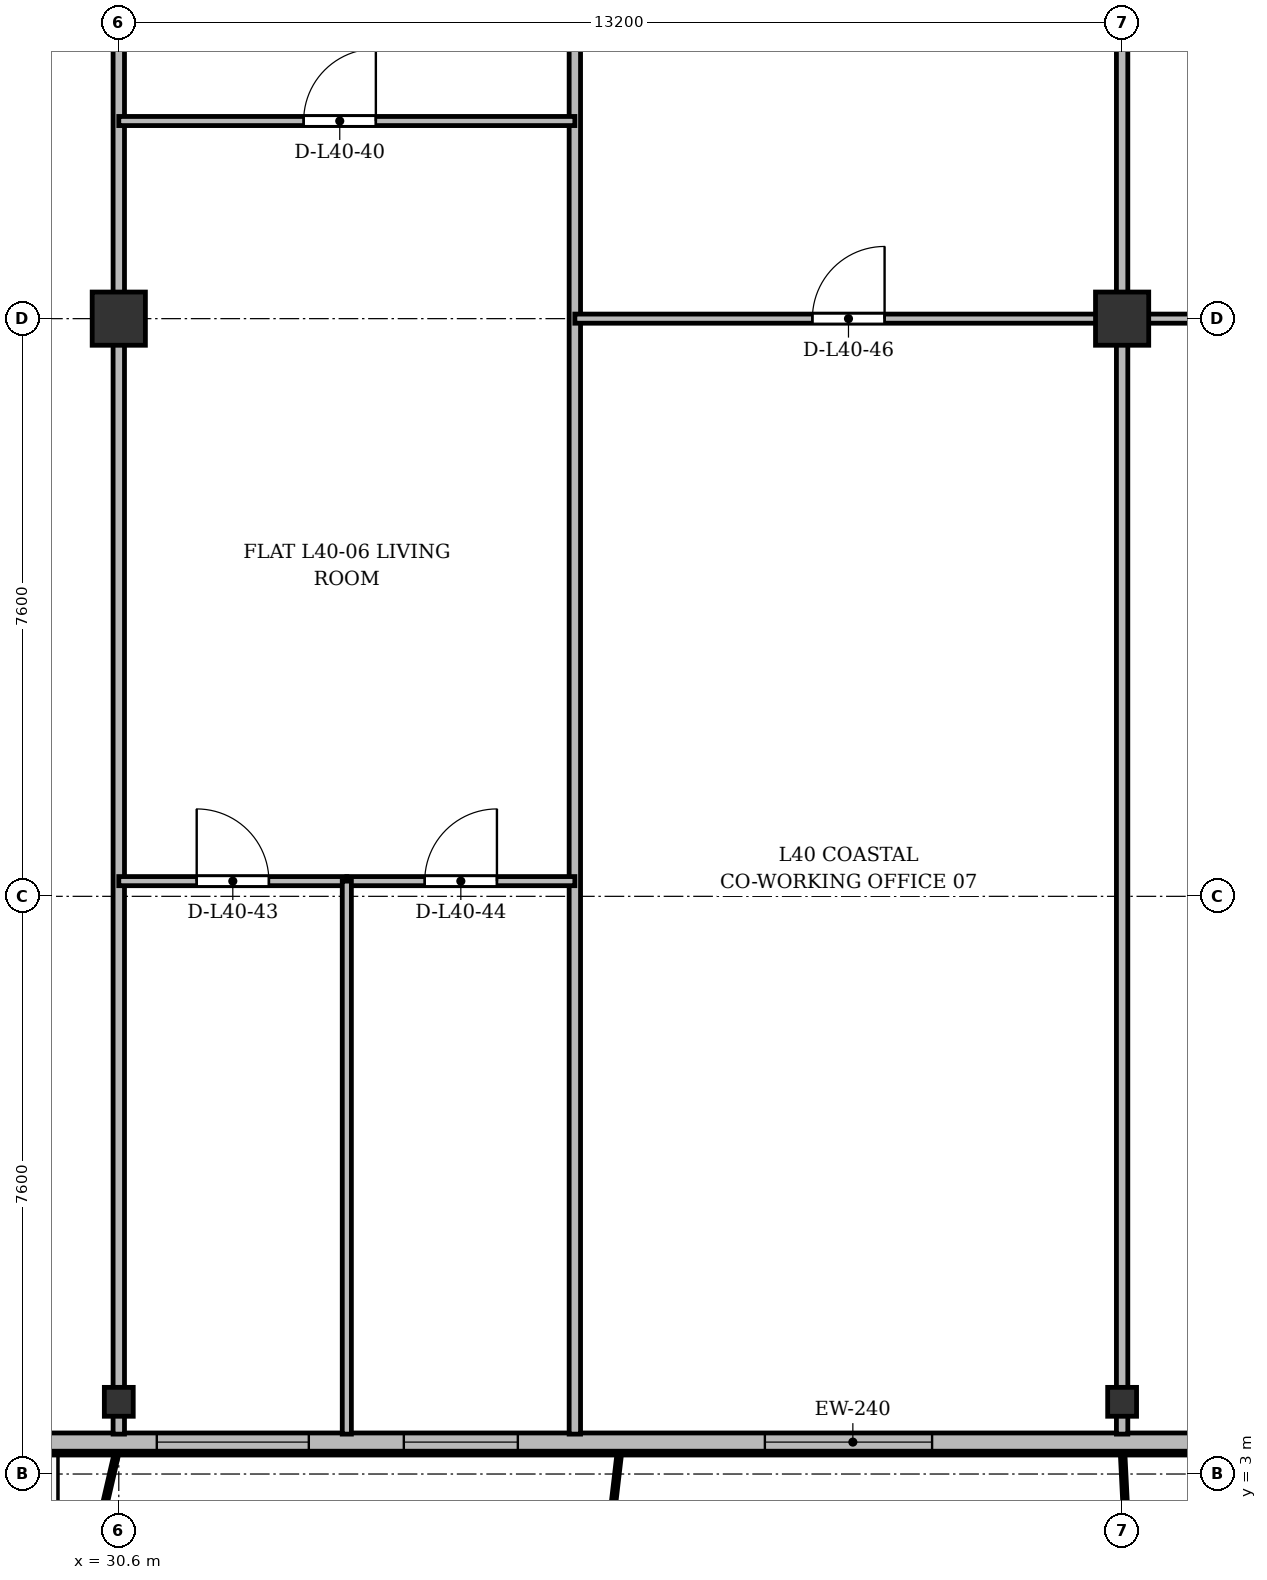
"""IFC4 building model, lengths in metres.
Left out: names, types, materials, properties, quantities, classifications, styles, units other than length and angle.
Written with IfcOpenShell. Run it as: python <this file> out.ifc"""

import sys

from ifc_helpers import new_model, si_unit, direction, frame, frame_2d, origin, origin_2d, place, context, subcontext, project, spatial, rectangle, i_section, extrude, source, transform, mapped, element, fill, save


model = new_model("IFC4")
c1 = context("Model", 3, precision=1e-05, world=origin(), true_north=direction((0.0, 1.0)))
c2 = subcontext(c1, "Body", "Model", "MODEL_VIEW")
j1 = project(units=[si_unit("LENGTHUNIT", "METRE"), si_unit("PLANEANGLEUNIT", "RADIAN")], contexts=[c1])
p1 = place(None, origin())
s1 = spatial("IfcSite", under=j1, at=p1, CompositionType="ELEMENT")
p2 = place(p1, origin())
s2 = spatial("IfcBuilding", under=s1, at=p2, CompositionType="ELEMENT")
p3 = place(p2, frame((0.0, 0.0, 153.7)))
s3 = spatial("IfcBuildingStorey", under=s2, at=p3, CompositionType="ELEMENT", Elevation=153.7)
m1 = source(origin(), c2, "Body", "SweptSolid", [
    extrude(i_section(OverallWidth=0.38, OverallDepth=0.38, WebThickness=0.02, FlangeThickness=0.03, at=origin_2d()), origin(), (0.0, 0.0, 1.0), 3.6),
])
p4 = place(p3, frame((30.6, 3.95, 0.0), z_axis=(0.0, 0.0, 1.0), x_axis=(1.0, 0.0, 0.0)))
e1 = element("IfcColumn", 1, at=p4, inside=s3, PredefinedType="COLUMN", context=c2, shape_type="MappedRepresentation", body=[
    mapped(m1, transform((0.0, 0.0, 0.0), x_axis=(1.0, 0.0, 0.0), y_axis=(0.0, 1.0, 0.0), z_axis=(0.0, 0.0, 1.0), scale=1.0)),
])
m2 = source(origin(), c2, "Body", "SweptSolid", [
    extrude(rectangle(XDim=0.7, YDim=0.7, at=origin_2d()), origin(), (0.0, 0.0, 1.0), 3.6),
])
p5 = place(p3, frame((30.6, 18.2, 0.0), z_axis=(0.0, 0.0, 1.0), x_axis=(1.0, 0.0, 0.0)))
e2 = element("IfcColumn", 2, at=p5, inside=s3, PredefinedType="COLUMN", context=c2, shape_type="MappedRepresentation", body=[
    mapped(m2, transform((0.0, 0.0, 0.0), x_axis=(1.0, 0.0, 0.0), y_axis=(0.0, 1.0, 0.0), z_axis=(0.0, 0.0, 1.0), scale=1.0)),
])
p6 = place(p3, frame((43.8, 3.95, 0.0), z_axis=(0.0, 0.0, 1.0), x_axis=(1.0, 0.0, 0.0)))
e3 = element("IfcColumn", 3, at=p6, inside=s3, PredefinedType="COLUMN", context=c2, shape_type="MappedRepresentation", body=[
    mapped(m1, transform((0.0, 0.0, 0.0), x_axis=(1.0, 0.0, 0.0), y_axis=(0.0, 1.0, 0.0), z_axis=(0.0, 0.0, 1.0), scale=1.0)),
])
p7 = place(p3, frame((43.8, 18.2, 0.0), z_axis=(0.0, 0.0, 1.0), x_axis=(1.0, 0.0, 0.0)))
e4 = element("IfcColumn", 4, at=p7, inside=s3, PredefinedType="COLUMN", context=c2, shape_type="MappedRepresentation", body=[
    mapped(m2, transform((0.0, 0.0, 0.0), x_axis=(1.0, 0.0, 0.0), y_axis=(0.0, 1.0, 0.0), z_axis=(0.0, 0.0, 1.0), scale=1.0)),
])
p8 = place(p3, frame((63.6, 3.42, 0.0), z_axis=(0.0, 0.0, 1.0), x_axis=(-1.0, 0.0, 0.0)))
e5 = element("IfcWall", 5, at=p8, inside=s3, PredefinedType="SOLIDWALL", context=c2, shape_type="SweptSolid", body=[
    extrude(rectangle(XDim=52.8, YDim=0.24, at=frame_2d((26.4, 0.0))), origin(), (0.0, 0.0, 1.0), 3.35),
])
p9 = place(p8, frame((0.295, 0.0, 0.9)))
e6 = element("IfcOpeningElement", 6, at=p9, cuts=e5, PredefinedType="OPENING", context=c2, shape_type="SweptSolid", body=[
    extrude(rectangle(XDim=1.5, YDim=1.75, at=frame_2d((0.75, 0.875))), frame((0.0, 0.13, 0.0), z_axis=(0.0, -1.0, 0.0), x_axis=(1.0, 0.0, 0.0)), (0.0, 0.0, 1.0), 0.26),
])
p10 = place(p8, frame((3.6, 0.0, 0.9)))
e7 = element("IfcOpeningElement", 7, at=p10, cuts=e5, PredefinedType="OPENING", context=c2, shape_type="SweptSolid", body=[
    extrude(rectangle(XDim=2.2, YDim=1.8, at=frame_2d((1.1, 0.9))), frame((0.0, 0.13, 0.0), z_axis=(0.0, -1.0, 0.0), x_axis=(1.0, 0.0, 0.0)), (0.0, 0.0, 1.0), 0.26),
])
p11 = place(p8, frame((7.635, 0.0, 0.0)))
e8 = element("IfcOpeningElement", 8, at=p11, cuts=e5, PredefinedType="OPENING", context=c2, shape_type="SweptSolid", body=[
    extrude(rectangle(XDim=1.2, YDim=2.2, at=frame_2d((0.6, 1.1))), frame((0.0, 0.13, 0.0), z_axis=(0.0, -1.0, 0.0), x_axis=(1.0, 0.0, 0.0)), (0.0, 0.0, 1.0), 0.26),
])
p12 = place(p8, frame((9.6, 0.0, 0.9)))
e9 = element("IfcOpeningElement", 9, at=p12, cuts=e5, PredefinedType="OPENING", context=c2, shape_type="SweptSolid", body=[
    extrude(rectangle(XDim=2.0, YDim=1.95, at=frame_2d((1.0, 0.975))), frame((0.0, 0.13, 0.0), z_axis=(0.0, -1.0, 0.0), x_axis=(1.0, 0.0, 0.0)), (0.0, 0.0, 1.0), 0.26),
])
p13 = place(p8, frame((12.175, 0.0, 0.9)))
e10 = element("IfcOpeningElement", 10, at=p13, cuts=e5, PredefinedType="OPENING", context=c2, shape_type="SweptSolid", body=[
    extrude(rectangle(XDim=1.65, YDim=1.85, at=frame_2d((0.825, 0.925))), frame((0.0, 0.13, 0.0), z_axis=(0.0, -1.0, 0.0), x_axis=(1.0, 0.0, 0.0)), (0.0, 0.0, 1.0), 0.26),
])
p14 = place(p8, frame((16.1, 0.0, 0.9)))
e11 = element("IfcOpeningElement", 11, at=p14, cuts=e5, PredefinedType="OPENING", context=c2, shape_type="SweptSolid", body=[
    extrude(rectangle(XDim=1.8, YDim=1.8, at=frame_2d((0.9, 0.9))), frame((0.0, 0.13, 0.0), z_axis=(0.0, -1.0, 0.0), x_axis=(1.0, 0.0, 0.0)), (0.0, 0.0, 1.0), 0.26),
])
p15 = place(p8, frame((22.3, 0.0, 0.9)))
e12 = element("IfcOpeningElement", 12, at=p15, cuts=e5, PredefinedType="OPENING", context=c2, shape_type="SweptSolid", body=[
    extrude(rectangle(XDim=2.2, YDim=1.8, at=frame_2d((1.1, 0.9))), frame((0.0, 0.13, 0.0), z_axis=(0.0, -1.0, 0.0), x_axis=(1.0, 0.0, 0.0)), (0.0, 0.0, 1.0), 0.26),
])
p16 = place(p8, frame((27.75, 0.0, 0.9)))
e13 = element("IfcOpeningElement", 13, at=p16, cuts=e5, PredefinedType="OPENING", context=c2, shape_type="SweptSolid", body=[
    extrude(rectangle(XDim=1.5, YDim=1.75, at=frame_2d((0.75, 0.875))), frame((0.0, 0.13, 0.0), z_axis=(0.0, -1.0, 0.0), x_axis=(1.0, 0.0, 0.0)), (0.0, 0.0, 1.0), 0.26),
])
p17 = place(p8, frame((30.5, 0.0, 0.9)))
e14 = element("IfcOpeningElement", 14, at=p17, cuts=e5, PredefinedType="OPENING", context=c2, shape_type="SweptSolid", body=[
    extrude(rectangle(XDim=2.0, YDim=1.95, at=frame_2d((1.0, 0.975))), frame((0.0, 0.13, 0.0), z_axis=(0.0, -1.0, 0.0), x_axis=(1.0, 0.0, 0.0)), (0.0, 0.0, 1.0), 0.26),
])
p18 = place(p8, frame((34.375, 0.0, 0.9)))
e15 = element("IfcOpeningElement", 15, at=p18, cuts=e5, PredefinedType="OPENING", context=c2, shape_type="SweptSolid", body=[
    extrude(rectangle(XDim=1.65, YDim=1.85, at=frame_2d((0.825, 0.925))), frame((0.0, 0.13, 0.0), z_axis=(0.0, -1.0, 0.0), x_axis=(1.0, 0.0, 0.0)), (0.0, 0.0, 1.0), 0.26),
])
p19 = place(p8, frame((39.5, 0.0, 0.9)))
e16 = element("IfcOpeningElement", 16, at=p19, cuts=e5, PredefinedType="OPENING", context=c2, shape_type="SweptSolid", body=[
    extrude(rectangle(XDim=1.8, YDim=1.8, at=frame_2d((0.9, 0.9))), frame((0.0, 0.13, 0.0), z_axis=(0.0, -1.0, 0.0), x_axis=(1.0, 0.0, 0.0)), (0.0, 0.0, 1.0), 0.26),
])
p20 = place(p8, frame((43.65, 0.0, 0.9)))
e17 = element("IfcOpeningElement", 17, at=p20, cuts=e5, PredefinedType="OPENING", context=c2, shape_type="SweptSolid", body=[
    extrude(rectangle(XDim=1.5, YDim=1.75, at=frame_2d((0.75, 0.875))), frame((0.0, 0.13, 0.0), z_axis=(0.0, -1.0, 0.0), x_axis=(1.0, 0.0, 0.0)), (0.0, 0.0, 1.0), 0.26),
])
p21 = place(p8, frame((47.35, 0.0, 0.9)))
e18 = element("IfcOpeningElement", 18, at=p21, cuts=e5, PredefinedType="OPENING", context=c2, shape_type="SweptSolid", body=[
    extrude(rectangle(XDim=1.5, YDim=1.75, at=frame_2d((0.75, 0.875))), frame((0.0, 0.13, 0.0), z_axis=(0.0, -1.0, 0.0), x_axis=(1.0, 0.0, 0.0)), (0.0, 0.0, 1.0), 0.26),
])
p22 = place(p8, frame((51.005, 0.0, 0.9)))
e19 = element("IfcOpeningElement", 19, at=p22, cuts=e5, PredefinedType="OPENING", context=c2, shape_type="SweptSolid", body=[
    extrude(rectangle(XDim=1.5, YDim=1.75, at=frame_2d((0.75, 0.875))), frame((0.0, 0.13, 0.0), z_axis=(0.0, -1.0, 0.0), x_axis=(1.0, 0.0, 0.0)), (0.0, 0.0, 1.0), 0.26),
])
p23 = place(p8, frame((37.85, 0.0, 0.0)))
e20 = element("IfcOpeningElement", 20, at=p23, cuts=e5, PredefinedType="OPENING", context=c2, shape_type="SweptSolid", body=[
    extrude(rectangle(XDim=1.2, YDim=2.2, at=frame_2d((0.6, 1.1))), frame((0.0, 0.13, 0.0), z_axis=(0.0, -1.0, 0.0), x_axis=(1.0, 0.0, 0.0)), (0.0, 0.0, 1.0), 0.26),
])
p24 = place(p3, frame((30.6, 3.525, 0.0), z_axis=(0.0, 0.0, 1.0), x_axis=(0.0, 1.0, 0.0)))
e21 = element("IfcWall", 21, at=p24, inside=s3, PredefinedType="PARTITIONING", context=c2, shape_type="SweptSolid", body=[
    extrude(rectangle(XDim=27.275, YDim=0.15, at=frame_2d((13.638, 0.0))), origin(), (0.0, 0.0, 1.0), 2.85),
])
p25 = place(p3, frame((36.6, 3.525, 0.0), z_axis=(0.0, 0.0, 1.0), x_axis=(0.0, 1.0, 0.0)))
e22 = element("IfcWall", 22, at=p25, inside=s3, PredefinedType="PARTITIONING", context=c2, shape_type="SweptSolid", body=[
    extrude(rectangle(XDim=27.275, YDim=0.15, at=frame_2d((13.638, 0.0))), origin(), (0.0, 0.0, 1.0), 2.75),
])
p26 = place(p3, frame((43.8, 3.525, 0.0), z_axis=(0.0, 0.0, 1.0), x_axis=(0.0, 1.0, 0.0)))
e23 = element("IfcWall", 23, at=p26, inside=s3, PredefinedType="PARTITIONING", context=c2, shape_type="SweptSolid", body=[
    extrude(rectangle(XDim=27.275, YDim=0.15, at=frame_2d((13.638, 0.0))), origin(), (0.0, 0.0, 1.0), 2.85),
])
p27 = place(p3, frame((30.6, 20.8, 0.0), z_axis=(0.0, 0.0, 1.0), x_axis=(1.0, 0.0, 0.0)))
e24 = element("IfcWall", 24, at=p27, inside=s3, PredefinedType="PARTITIONING", context=c2, shape_type="SweptSolid", body=[
    extrude(rectangle(XDim=6.0, YDim=0.12, at=frame_2d((3.0, 0.0))), origin(), (0.0, 0.0, 1.0), 2.85),
])
p28 = place(p27, frame((2.432, 0.0, 0.0)))
e25 = element("IfcOpeningElement", 25, at=p28, cuts=e24, PredefinedType="OPENING", context=c2, shape_type="SweptSolid", body=[
    extrude(rectangle(XDim=0.95, YDim=2.15, at=frame_2d((0.475, 1.075))), frame((0.0, 0.07, 0.0), z_axis=(0.0, -1.0, 0.0), x_axis=(1.0, 0.0, 0.0)), (0.0, 0.0, 1.0), 0.14),
])
p29 = place(p3, frame((30.6, 10.8, 0.0), z_axis=(0.0, 0.0, 1.0), x_axis=(1.0, 0.0, 0.0)))
e26 = element("IfcWall", 26, at=p29, inside=s3, PredefinedType="PARTITIONING", context=c2, shape_type="SweptSolid", body=[
    extrude(rectangle(XDim=3.0, YDim=0.12, at=frame_2d((1.5, 0.0))), origin(), (0.0, 0.0, 1.0), 2.85),
])
p30 = place(p29, frame((1.025, 0.0, 0.0)))
e27 = element("IfcOpeningElement", 27, at=p30, cuts=e26, PredefinedType="OPENING", context=c2, shape_type="SweptSolid", body=[
    extrude(rectangle(XDim=0.95, YDim=2.15, at=frame_2d((0.475, 1.075))), frame((0.0, 0.07, 0.0), z_axis=(0.0, -1.0, 0.0), x_axis=(1.0, 0.0, 0.0)), (0.0, 0.0, 1.0), 0.14),
])
p31 = place(p3, frame((33.6, 10.8, 0.0), z_axis=(0.0, 0.0, 1.0), x_axis=(1.0, 0.0, 0.0)))
e28 = element("IfcWall", 28, at=p31, inside=s3, PredefinedType="PARTITIONING", context=c2, shape_type="SweptSolid", body=[
    extrude(rectangle(XDim=3.0, YDim=0.12, at=frame_2d((1.5, 0.0))), origin(), (0.0, 0.0, 1.0), 3.35),
])
p32 = place(p31, frame((1.025, 0.0, 0.0)))
e29 = element("IfcOpeningElement", 29, at=p32, cuts=e28, PredefinedType="OPENING", context=c2, shape_type="SweptSolid", body=[
    extrude(rectangle(XDim=0.95, YDim=2.15, at=frame_2d((0.475, 1.075))), frame((0.0, 0.07, 0.0), z_axis=(0.0, -1.0, 0.0), x_axis=(1.0, 0.0, 0.0)), (0.0, 0.0, 1.0), 0.14),
])
p33 = place(p3, frame((33.6, 3.525, 0.0), z_axis=(0.0, 0.0, 1.0), x_axis=(0.0, 1.0, 0.0)))
e30 = element("IfcWall", 30, at=p33, inside=s3, PredefinedType="PARTITIONING", context=c2, shape_type="SweptSolid", body=[
    extrude(rectangle(XDim=7.275, YDim=0.12, at=frame_2d((3.638, 0.0))), origin(), (0.0, 0.0, 1.0), 2.75),
])
p34 = place(p3, frame((36.6, 18.2, 0.0), z_axis=(0.0, 0.0, 1.0), x_axis=(1.0, 0.0, 0.0)))
e31 = element("IfcWall", 31, at=p34, inside=s3, PredefinedType="PARTITIONING", context=c2, shape_type="SweptSolid", body=[
    extrude(rectangle(XDim=7.2, YDim=0.12, at=frame_2d((3.6, 0.0))), origin(), (0.0, 0.0, 1.0), 2.75),
])
p35 = place(p34, frame((3.125, 0.0, 0.0)))
e32 = element("IfcOpeningElement", 32, at=p35, cuts=e31, PredefinedType="OPENING", context=c2, shape_type="SweptSolid", body=[
    extrude(rectangle(XDim=0.95, YDim=2.15, at=frame_2d((0.475, 1.075))), frame((0.0, 0.07, 0.0), z_axis=(0.0, -1.0, 0.0), x_axis=(1.0, 0.0, 0.0)), (0.0, 0.0, 1.0), 0.14),
])
p36 = place(p3, frame((43.8, 18.2, 0.0), z_axis=(0.0, 0.0, 1.0), x_axis=(1.0, 0.0, 0.0)))
e33 = element("IfcWall", 33, at=p36, inside=s3, PredefinedType="PARTITIONING", context=c2, shape_type="SweptSolid", body=[
    extrude(rectangle(XDim=5.6, YDim=0.12, at=frame_2d((2.8, 0.0))), origin(), (0.0, 0.0, 1.0), 2.75),
])
p37 = place(p36, frame((2.418, 0.0, 0.0)))
e34 = element("IfcOpeningElement", 34, at=p37, cuts=e33, PredefinedType="OPENING", context=c2, shape_type="SweptSolid", body=[
    extrude(rectangle(XDim=0.95, YDim=2.15, at=frame_2d((0.475, 1.075))), frame((0.0, 0.07, 0.0), z_axis=(0.0, -1.0, 0.0), x_axis=(1.0, 0.0, 0.0)), (0.0, 0.0, 1.0), 0.14),
])
m3 = source(origin(), c2, "Body", "SweptSolid", [
    extrude(rectangle(XDim=2.2, YDim=1.8, at=frame_2d((1.1, 0.9))), frame((0.0, 0.03, 0.0), z_axis=(0.0, -1.0, 0.0), x_axis=(1.0, 0.0, 0.0)), (0.0, 0.0, 1.0), 0.06),
])
p38 = place(p15, origin())
e35 = element("IfcWindow", 35, at=p38, inside=s3, PartitioningType="SINGLE_PANEL", PredefinedType="WINDOW", context=c2, shape_type="MappedRepresentation", body=[
    mapped(m3, transform((0.0, 0.0, 0.0), x_axis=(1.0, 0.0, 0.0), y_axis=(0.0, 1.0, 0.0), z_axis=(0.0, 0.0, 1.0), scale=1.0)),
])
fill(e12, e35)
m4 = source(origin(), c2, "Body", "SweptSolid", [
    extrude(rectangle(XDim=1.5, YDim=1.75, at=frame_2d((0.75, 0.875))), frame((0.0, 0.03, 0.0), z_axis=(0.0, -1.0, 0.0), x_axis=(1.0, 0.0, 0.0)), (0.0, 0.0, 1.0), 0.06),
])
p39 = place(p16, origin())
e36 = element("IfcWindow", 36, at=p39, inside=s3, PartitioningType="SINGLE_PANEL", PredefinedType="WINDOW", context=c2, shape_type="MappedRepresentation", body=[
    mapped(m4, transform((0.0, 0.0, 0.0), x_axis=(1.0, 0.0, 0.0), y_axis=(0.0, 1.0, 0.0), z_axis=(0.0, 0.0, 1.0), scale=1.0)),
])
fill(e13, e36)
m5 = source(origin(), c2, "Body", "SweptSolid", [
    extrude(rectangle(XDim=2.0, YDim=1.95, at=frame_2d((1.0, 0.975))), frame((0.0, 0.03, 0.0), z_axis=(0.0, -1.0, 0.0), x_axis=(1.0, 0.0, 0.0)), (0.0, 0.0, 1.0), 0.06),
])
p40 = place(p17, origin())
e37 = element("IfcWindow", 37, at=p40, inside=s3, PartitioningType="SINGLE_PANEL", PredefinedType="WINDOW", context=c2, shape_type="MappedRepresentation", body=[
    mapped(m5, transform((0.0, 0.0, 0.0), x_axis=(1.0, 0.0, 0.0), y_axis=(0.0, 1.0, 0.0), z_axis=(0.0, 0.0, 1.0), scale=1.0)),
])
fill(e14, e37)
m6 = source(origin(), c2, "Body", "SweptSolid", [
    extrude(rectangle(XDim=0.95, YDim=2.15, at=frame_2d((0.475, 1.075))), frame((0.0, 0.025, 0.0), z_axis=(0.0, -1.0, 0.0), x_axis=(1.0, 0.0, 0.0)), (0.0, 0.0, 1.0), 0.05),
])
p41 = place(p28, origin())
e38 = element("IfcDoor", 38, at=p41, inside=s3, OperationType="SINGLE_SWING_RIGHT", PredefinedType="DOOR", context=c2, shape_type="MappedRepresentation", body=[
    mapped(m6, transform((0.0, 0.0, 0.0), x_axis=(1.0, 0.0, 0.0), y_axis=(0.0, 1.0, 0.0), z_axis=(0.0, 0.0, 1.0), scale=1.0)),
])
fill(e25, e38)
p42 = place(p30, origin())
e39 = element("IfcDoor", 39, at=p42, inside=s3, OperationType="SINGLE_SWING_LEFT", PredefinedType="DOOR", context=c2, shape_type="MappedRepresentation", body=[
    mapped(m6, transform((0.0, 0.0, 0.0), x_axis=(1.0, 0.0, 0.0), y_axis=(0.0, 1.0, 0.0), z_axis=(0.0, 0.0, 1.0), scale=1.0)),
])
fill(e27, e39)
p43 = place(p32, origin())
e40 = element("IfcDoor", 40, at=p43, inside=s3, OperationType="SINGLE_SWING_RIGHT", PredefinedType="DOOR", context=c2, shape_type="MappedRepresentation", body=[
    mapped(m6, transform((0.0, 0.0, 0.0), x_axis=(1.0, 0.0, 0.0), y_axis=(0.0, 1.0, 0.0), z_axis=(0.0, 0.0, 1.0), scale=1.0)),
])
fill(e29, e40)
p44 = place(p35, origin())
e41 = element("IfcDoor", 41, at=p44, inside=s3, OperationType="SINGLE_SWING_RIGHT", PredefinedType="DOOR", context=c2, shape_type="MappedRepresentation", body=[
    mapped(m6, transform((0.0, 0.0, 0.0), x_axis=(1.0, 0.0, 0.0), y_axis=(0.0, 1.0, 0.0), z_axis=(0.0, 0.0, 1.0), scale=1.0)),
])
fill(e32, e41)
save(model, sys.argv[1])
